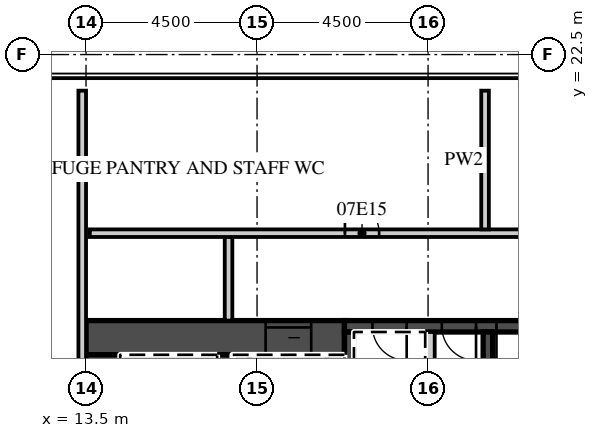
"""IFC4 building model, lengths in metres.
Left out: names, types, materials, properties, quantities, classifications, styles, units other than length and angle.
Written with IfcOpenShell. Run it as: python <this file> out.ifc"""

import sys

from ifc_helpers import new_model, si_unit, direction, frame, frame_2d, origin, place, context, subcontext, project, spatial, rectangle, extrude, element, fill, save


model = new_model("IFC4")
c1 = context("Model", 3, precision=1e-05, world=origin(), true_north=direction((0.0, 1.0)))
c2 = subcontext(c1, "Body", "Model", "MODEL_VIEW")
j1 = project(units=[si_unit("LENGTHUNIT", "METRE"), si_unit("PLANEANGLEUNIT", "RADIAN")], contexts=[c1])
p1 = place(None, origin())
s1 = spatial("IfcSite", under=j1, at=p1, CompositionType="ELEMENT")
p2 = place(p1, origin())
s2 = spatial("IfcBuilding", under=s1, at=p2, CompositionType="ELEMENT")
p3 = place(p2, frame((0.0, 0.0, 47.0)))
s3 = spatial("IfcBuildingStorey", under=s2, at=p3, CompositionType="ELEMENT", Elevation=47.0)
p4 = place(p3, frame((13.5, 15.05, 0.0), z_axis=(0.0, 0.0, 1.0), x_axis=(1.0, 0.0, 0.0)))
e1 = element("IfcWall", 1, at=p4, inside=s3, PredefinedType="SHEAR", context=c2, shape_type="SweptSolid", body=[
    extrude(rectangle(XDim=6.8, YDim=0.9, at=frame_2d((3.4, 0.0))), origin(), (0.0, 0.0, 1.0), 5.6),
])
p5 = place(p4, frame((4.725, 0.0, 0.0)))
e2 = element("IfcOpeningElement", 2, at=p5, cuts=e1, PredefinedType="OPENING", context=c2, shape_type="SweptSolid", body=[
    extrude(rectangle(XDim=1.2, YDim=2.1, at=frame_2d((0.6, 1.05))), frame((0.0, 0.46, 0.0), z_axis=(0.0, -1.0, 0.0), x_axis=(1.0, 0.0, 0.0)), (0.0, 0.0, 1.0), 0.92),
])
p6 = place(p3, frame((20.3, 15.35, 0.0), z_axis=(0.0, 0.0, 1.0), x_axis=(1.0, 0.0, 0.0)))
e3 = element("IfcWall", 3, at=p6, inside=s3, PredefinedType="SHEAR", context=c2, shape_type="SweptSolid", body=[
    extrude(rectangle(XDim=10.3, YDim=0.3, at=frame_2d((5.15, 0.0))), origin(), (0.0, 0.0, 1.0), 5.6),
])
p7 = place(p6, frame((4.0, 0.0, 0.0)))
e4 = element("IfcOpeningElement", 4, at=p7, cuts=e3, PredefinedType="OPENING", context=c2, shape_type="SweptSolid", body=[
    extrude(rectangle(XDim=1.3, YDim=2.1, at=frame_2d((0.65, 1.05))), frame((0.0, 0.16, 0.0), z_axis=(0.0, -1.0, 0.0), x_axis=(1.0, 0.0, 0.0)), (0.0, 0.0, 1.0), 0.32),
])
p8 = place(p6, frame((2.562, 0.0, 0.0)))
e5 = element("IfcOpeningElement", 5, at=p8, cuts=e3, PredefinedType="OPENING", context=c2, shape_type="SweptSolid", body=[
    extrude(rectangle(XDim=0.9, YDim=2.1, at=frame_2d((0.45, 1.05))), frame((0.0, 0.16, 0.0), z_axis=(0.0, -1.0, 0.0), x_axis=(1.0, 0.0, 0.0)), (0.0, 0.0, 1.0), 0.32),
])
p9 = place(p6, frame((0.738, 0.0, 0.0)))
e6 = element("IfcOpeningElement", 6, at=p9, cuts=e3, PredefinedType="OPENING", context=c2, shape_type="SweptSolid", body=[
    extrude(rectangle(XDim=0.9, YDim=2.1, at=frame_2d((0.45, 1.05))), frame((0.0, 0.16, 0.0), z_axis=(0.0, -1.0, 0.0), x_axis=(1.0, 0.0, 0.0)), (0.0, 0.0, 1.0), 0.32),
])
p10 = place(p3, frame((13.95, 2.4, 0.0), z_axis=(0.0, 0.0, 1.0), x_axis=(0.0, 1.0, 0.0)))
e7 = element("IfcWall", 7, at=p10, inside=s3, PredefinedType="SHEAR", context=c2, shape_type="SweptSolid", body=[
    extrude(rectangle(XDim=12.2, YDim=0.9, at=frame_2d((6.1, 0.0))), origin(), (0.0, 0.0, 1.0), 5.6),
])
p11 = place(p3, frame((17.15, 8.8, 0.0), z_axis=(0.0, 0.0, 1.0), x_axis=(0.0, 1.0, 0.0)))
e8 = element("IfcWall", 8, at=p11, inside=s3, PredefinedType="SHEAR", context=c2, shape_type="SweptSolid", body=[
    extrude(rectangle(XDim=5.8, YDim=0.4, at=frame_2d((2.9, 0.0))), origin(), (0.0, 0.0, 1.0), 5.6),
])
for number, where, z_axis, x_axis in (
    (9, (20.425, 11.95, 0.0), (0.0, 0.0, 1.0), (0.0, 1.0, 0.0)),
    (10, (24.075, 11.95, 0.0), (0.0, 0.0, 1.0), (0.0, 1.0, 0.0)),
):
    element("IfcWall", number, at=place(p3, frame(where, z_axis=z_axis, x_axis=x_axis)), inside=s3, PredefinedType="SHEAR", context=c2, shape_type="SweptSolid", body=[
        extrude(rectangle(XDim=3.25, YDim=0.25, at=frame_2d((1.625, 0.0))), origin(), (0.0, 0.0, 1.0), 5.6),
    ])
p12 = place(p3, frame((22.55, 11.95, 0.0), z_axis=(0.0, 0.0, 1.0), x_axis=(0.0, 1.0, 0.0)))
e11 = element("IfcWall", 11, at=p12, inside=s3, PredefinedType="PARTITIONING", context=c2, shape_type="SweptSolid", body=[
    extrude(rectangle(XDim=3.25, YDim=0.25, at=frame_2d((1.625, 0.0))), origin(), (0.0, 0.0, 1.0), 5.6),
])
p13 = place(p3, frame((17.25, 15.5, 0.0), z_axis=(0.0, 0.0, 1.0), x_axis=(0.0, 1.0, 0.0)))
e12 = element("IfcWall", 12, at=p13, inside=s3, PredefinedType="PARTITIONING", context=c2, shape_type="SweptSolid", body=[
    extrude(rectangle(XDim=2.2, YDim=0.2, at=frame_2d((1.1, 0.0))), origin(), (0.0, 0.0, 1.0), 5.6),
])
p14 = place(p3, frame((13.6, 17.8, 0.0), z_axis=(0.0, 0.0, 1.0), x_axis=(1.0, 0.0, 0.0)))
e13 = element("IfcWall", 13, at=p14, inside=s3, PredefinedType="PARTITIONING", context=c2, shape_type="SweptSolid", body=[
    extrude(rectangle(XDim=30.95, YDim=0.2, at=frame_2d((15.475, 0.0))), origin(), (0.0, 0.0, 1.0), 5.6),
])
p15 = place(p14, frame((15.012, 0.0, 0.0)))
e14 = element("IfcOpeningElement", 14, at=p15, cuts=e13, PredefinedType="OPENING", context=c2, shape_type="SweptSolid", body=[
    extrude(rectangle(XDim=0.9, YDim=2.1, at=frame_2d((0.45, 1.05))), frame((0.0, 0.11, 0.0), z_axis=(0.0, -1.0, 0.0), x_axis=(1.0, 0.0, 0.0)), (0.0, 0.0, 1.0), 0.22),
])
p16 = place(p14, frame((6.712, 0.0, 0.0)))
e15 = element("IfcOpeningElement", 15, at=p16, cuts=e13, PredefinedType="OPENING", context=c2, shape_type="SweptSolid", body=[
    extrude(rectangle(XDim=0.9, YDim=2.1, at=frame_2d((0.45, 1.05))), frame((0.0, 0.11, 0.0), z_axis=(0.0, -1.0, 0.0), x_axis=(1.0, 0.0, 0.0)), (0.0, 0.0, 1.0), 0.22),
])
p17 = place(p3, frame((24.0, 17.9, 0.0), z_axis=(0.0, 0.0, 1.0), x_axis=(0.0, 1.0, 0.0)))
e16 = element("IfcWall", 16, at=p17, inside=s3, PredefinedType="PARTITIONING", context=c2, shape_type="SweptSolid", body=[
    extrude(rectangle(XDim=3.65, YDim=0.2, at=frame_2d((1.825, 0.0))), origin(), (0.0, 0.0, 1.0), 5.6),
])
p18 = place(p3, frame((13.4, 1.8, 0.0), z_axis=(0.0, 0.0, 1.0), x_axis=(0.0, 1.0, 0.0)))
e17 = element("IfcWall", 17, at=p18, inside=s3, PredefinedType="PARTITIONING", context=c2, shape_type="SweptSolid", body=[
    extrude(rectangle(XDim=19.75, YDim=0.2, at=frame_2d((9.875, 0.0))), origin(), (0.0, 0.0, 1.0), 5.6),
])
p19 = place(p5, origin())
e18 = element("IfcDoor", 18, at=p19, inside=s3, OperationType="SLIDING_TO_LEFT", PredefinedType="DOOR", context=c2, shape_type="SweptSolid", body=[
    extrude(rectangle(XDim=1.2, YDim=2.1, at=frame_2d((0.6, 1.05))), frame((0.0, 0.025, 0.0), z_axis=(0.0, -1.0, 0.0), x_axis=(1.0, 0.0, 0.0)), (0.0, 0.0, 1.0), 0.05),
])
fill(e2, e18)
p20 = place(p7, origin())
e19 = element("IfcDoor", 19, at=p20, inside=s3, OperationType="SINGLE_SWING_LEFT", PredefinedType="DOOR", context=c2, shape_type="SweptSolid", body=[
    extrude(rectangle(XDim=1.3, YDim=2.1, at=frame_2d((0.65, 1.05))), frame((0.0, 0.025, 0.0), z_axis=(0.0, -1.0, 0.0), x_axis=(1.0, 0.0, 0.0)), (0.0, 0.0, 1.0), 0.05),
])
fill(e4, e19)
p21 = place(p8, origin())
e20 = element("IfcDoor", 20, at=p21, inside=s3, OperationType="SINGLE_SWING_RIGHT", PredefinedType="DOOR", context=c2, shape_type="SweptSolid", body=[
    extrude(rectangle(XDim=0.9, YDim=2.1, at=frame_2d((0.45, 1.05))), frame((0.0, 0.025, 0.0), z_axis=(0.0, -1.0, 0.0), x_axis=(1.0, 0.0, 0.0)), (0.0, 0.0, 1.0), 0.05),
])
fill(e5, e20)
p22 = place(p9, origin())
e21 = element("IfcDoor", 21, at=p22, inside=s3, OperationType="SINGLE_SWING_RIGHT", PredefinedType="DOOR", context=c2, shape_type="SweptSolid", body=[
    extrude(rectangle(XDim=0.9, YDim=2.1, at=frame_2d((0.45, 1.05))), frame((0.0, 0.025, 0.0), z_axis=(0.0, -1.0, 0.0), x_axis=(1.0, 0.0, 0.0)), (0.0, 0.0, 1.0), 0.05),
])
fill(e6, e21)
p23 = place(p16, origin())
e22 = element("IfcDoor", 22, at=p23, inside=s3, OperationType="SINGLE_SWING_LEFT", PredefinedType="DOOR", context=c2, shape_type="SweptSolid", body=[
    extrude(rectangle(XDim=0.9, YDim=2.1, at=frame_2d((0.45, 1.05))), frame((0.0, 0.025, 0.0), z_axis=(0.0, -1.0, 0.0), x_axis=(1.0, 0.0, 0.0)), (0.0, 0.0, 1.0), 0.05),
])
fill(e15, e22)
save(model, sys.argv[1])
